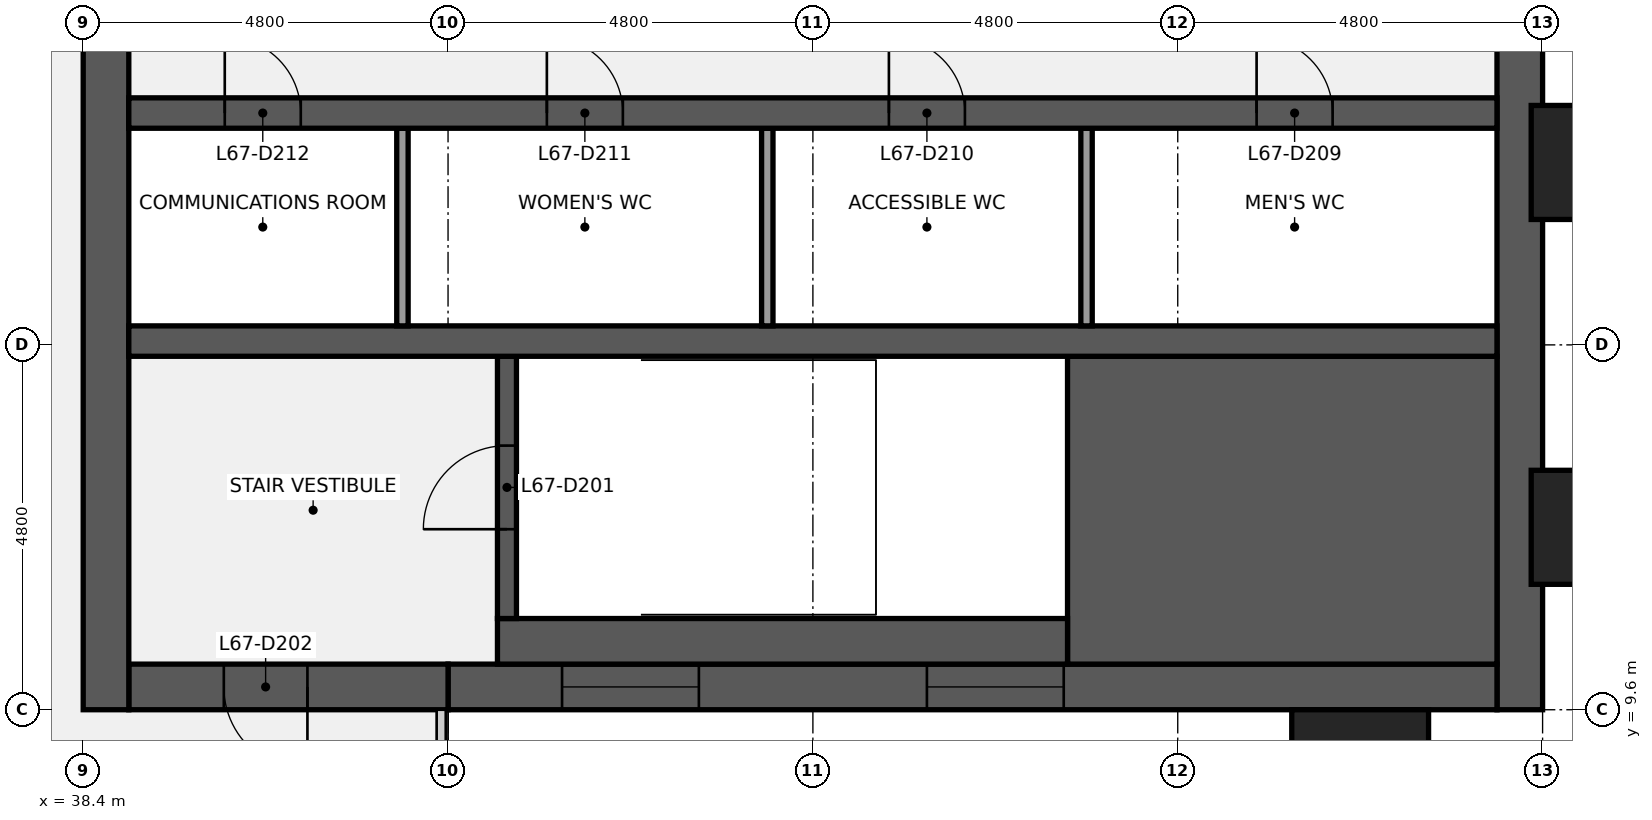
"""IFC4 building model, lengths in metres.
Left out: names, types, materials, properties, quantities, classifications, styles, units other than length and angle.
Written with IfcOpenShell. Run it as: python <this file> out.ifc"""

import sys

from ifc_helpers import new_model, si_unit, direction, frame, frame_2d, origin, origin_2d, place, context, subcontext, project, spatial, rectangle, extrude, element, fill, save


model = new_model("IFC4")
c1 = context("Model", 3, precision=1e-05, world=origin(), true_north=direction((0.0, 1.0)))
c2 = subcontext(c1, "Body", "Model", "MODEL_VIEW")
j1 = project(units=[si_unit("LENGTHUNIT", "METRE"), si_unit("PLANEANGLEUNIT", "RADIAN")], contexts=[c1])
p1 = place(None, origin())
s1 = spatial("IfcSite", under=j1, at=p1, CompositionType="ELEMENT")
p2 = place(p1, origin())
s2 = spatial("IfcBuilding", under=s1, at=p2, CompositionType="ELEMENT")
p3 = place(p2, frame((0.0, 0.0, 306.3)))
s3 = spatial("IfcBuildingStorey", under=s2, at=p3, CompositionType="ELEMENT", Elevation=306.3)
p4 = place(p3, frame((57.3, 38.4, 0.0), z_axis=(0.0, 0.0, 1.0), x_axis=(0.0, -1.0, 0.0)))
e1 = element("IfcWall", 1, at=p4, inside=s3, PredefinedType="SHEAR", context=c2, shape_type="SweptSolid", body=[
    extrude(rectangle(XDim=28.8, YDim=0.6, at=frame_2d((14.4, 0.0))), origin(), (0.0, 0.0, 1.0), 3.84),
])
p5 = place(p4, frame((18.45, 0.0, 0.9)))
e2 = element("IfcOpeningElement", 2, at=p5, cuts=e1, PredefinedType="OPENING", context=c2, shape_type="SweptSolid", body=[
    extrude(rectangle(XDim=1.5, YDim=1.5, at=frame_2d((0.75, 0.75))), frame((0.0, 0.31, 0.0), z_axis=(0.0, -1.0, 0.0), x_axis=(1.0, 0.0, 0.0)), (0.0, 0.0, 1.0), 0.62),
])
p6 = place(p4, frame((8.85, 0.0, 0.9)))
e3 = element("IfcOpeningElement", 3, at=p6, cuts=e1, PredefinedType="OPENING", context=c2, shape_type="SweptSolid", body=[
    extrude(rectangle(XDim=1.5, YDim=1.5, at=frame_2d((0.75, 0.75))), frame((0.0, 0.31, 0.0), z_axis=(0.0, -1.0, 0.0), x_axis=(1.0, 0.0, 0.0)), (0.0, 0.0, 1.0), 0.62),
])
p7 = place(p3, frame((57.0, 9.9, 0.0), z_axis=(0.0, 0.0, 1.0), x_axis=(-1.0, 0.0, 0.0)))
e4 = element("IfcWall", 4, at=p7, inside=s3, PredefinedType="SHEAR", context=c2, shape_type="SweptSolid", body=[
    extrude(rectangle(XDim=13.8, YDim=0.6, at=frame_2d((6.9, 0.0))), origin(), (0.0, 0.0, 1.0), 3.84),
])
p8 = place(p7, frame((5.7, 0.0, 0.9)))
e5 = element("IfcOpeningElement", 5, at=p8, cuts=e4, PredefinedType="OPENING", context=c2, shape_type="SweptSolid", body=[
    extrude(rectangle(XDim=1.8, YDim=1.5, at=frame_2d((0.9, 0.75))), frame((0.0, 0.31, 0.0), z_axis=(0.0, -1.0, 0.0), x_axis=(1.0, 0.0, 0.0)), (0.0, 0.0, 1.0), 0.62),
])
p9 = place(p7, frame((10.5, 0.0, 0.9)))
e6 = element("IfcOpeningElement", 6, at=p9, cuts=e4, PredefinedType="OPENING", context=c2, shape_type="SweptSolid", body=[
    extrude(rectangle(XDim=1.8, YDim=1.5, at=frame_2d((0.9, 0.75))), frame((0.0, 0.31, 0.0), z_axis=(0.0, -1.0, 0.0), x_axis=(1.0, 0.0, 0.0)), (0.0, 0.0, 1.0), 0.62),
])
p10 = place(p3, frame((43.2, 9.9, 0.0), z_axis=(0.0, 0.0, 1.0), x_axis=(-1.0, 0.0, 0.0)))
e7 = element("IfcWall", 7, at=p10, inside=s3, PredefinedType="SHEAR", context=c2, shape_type="SweptSolid", body=[
    extrude(rectangle(XDim=4.2, YDim=0.6, at=frame_2d((2.1, 0.0))), origin(), (0.0, 0.0, 1.0), 3.84),
])
p11 = place(p10, frame((1.85, 0.0, 0.0)))
e8 = element("IfcOpeningElement", 8, at=p11, cuts=e7, PredefinedType="OPENING", context=c2, shape_type="SweptSolid", body=[
    extrude(rectangle(XDim=1.1, YDim=2.1, at=frame_2d((0.55, 1.05))), frame((0.0, 0.31, 0.0), z_axis=(0.0, -1.0, 0.0), x_axis=(1.0, 0.0, 0.0)), (0.0, 0.0, 1.0), 0.62),
])
p12 = place(p3, frame((38.7, 9.6, 0.0), z_axis=(0.0, 0.0, 1.0), x_axis=(0.0, 1.0, 0.0)))
e9 = element("IfcWall", 9, at=p12, inside=s3, PredefinedType="SHEAR", context=c2, shape_type="SweptSolid", body=[
    extrude(rectangle(XDim=28.8, YDim=0.6, at=frame_2d((14.4, 0.0))), origin(), (0.0, 0.0, 1.0), 3.84),
])
p13 = place(p12, frame((8.7, 0.0, 0.0)))
e10 = element("IfcOpeningElement", 10, at=p13, cuts=e9, PredefinedType="OPENING", context=c2, shape_type="SweptSolid", body=[
    extrude(rectangle(XDim=1.8, YDim=2.1, at=frame_2d((0.9, 1.05))), frame((0.0, 0.31, 0.0), z_axis=(0.0, -1.0, 0.0), x_axis=(1.0, 0.0, 0.0)), (0.0, 0.0, 1.0), 0.62),
])
p14 = place(p12, frame((18.3, 0.0, 0.0)))
e11 = element("IfcOpeningElement", 11, at=p14, cuts=e9, PredefinedType="OPENING", context=c2, shape_type="SweptSolid", body=[
    extrude(rectangle(XDim=1.8, YDim=2.1, at=frame_2d((0.9, 1.05))), frame((0.0, 0.31, 0.0), z_axis=(0.0, -1.0, 0.0), x_axis=(1.0, 0.0, 0.0)), (0.0, 0.0, 1.0), 0.62),
])
p15 = place(p3, frame((51.35, 12.225, 0.0), z_axis=(0.0, 0.0, 1.0), x_axis=(1.0, 0.0, 0.0)))
e12 = element("IfcWall", 12, at=p15, inside=s3, PredefinedType="SHEAR", context=c2, shape_type="SweptSolid", body=[
    extrude(rectangle(XDim=5.65, YDim=4.05, at=frame_2d((2.825, 0.0))), origin(), (0.0, 0.0, 1.0), 3.84),
])
p16 = place(p3, frame((43.85, 10.5, 0.0), z_axis=(0.0, 0.0, 1.0), x_axis=(1.0, 0.0, 0.0)))
e13 = element("IfcWall", 13, at=p16, inside=s3, PredefinedType="SHEAR", context=c2, shape_type="SweptSolid", body=[
    extrude(rectangle(XDim=7.5, YDim=0.6, at=frame_2d((3.75, 0.0))), origin(), (0.0, 0.0, 1.0), 3.84),
])
p17 = place(p3, frame((43.975, 10.8, 0.0), z_axis=(0.0, 0.0, 1.0), x_axis=(0.0, 1.0, 0.0)))
e14 = element("IfcWall", 14, at=p17, inside=s3, PredefinedType="SHEAR", context=c2, shape_type="SweptSolid", body=[
    extrude(rectangle(XDim=3.45, YDim=0.25, at=frame_2d((1.725, 0.0))), origin(), (0.0, 0.0, 1.0), 3.84),
])
p18 = place(p17, frame((1.175, 0.0, 0.0)))
e15 = element("IfcOpeningElement", 15, at=p18, cuts=e14, PredefinedType="OPENING", context=c2, shape_type="SweptSolid", body=[
    extrude(rectangle(XDim=1.1, YDim=2.1, at=frame_2d((0.55, 1.05))), frame((0.0, 0.135, 0.0), z_axis=(0.0, -1.0, 0.0), x_axis=(1.0, 0.0, 0.0)), (0.0, 0.0, 1.0), 0.27),
])
p19 = place(p3, frame((39.0, 14.45, 0.0), z_axis=(0.0, 0.0, 1.0), x_axis=(1.0, 0.0, 0.0)))
e16 = element("IfcWall", 16, at=p19, inside=s3, PredefinedType="SHEAR", context=c2, shape_type="SweptSolid", body=[
    extrude(rectangle(XDim=18.0, YDim=0.4, at=frame_2d((9.0, 0.0))), origin(), (0.0, 0.0, 1.0), 3.84),
])
for number, where, z_axis, x_axis in (
    (17, (51.6, 14.65, 0.0), (0.0, 0.0, 1.0), (0.0, 1.0, 0.0)),
    (18, (47.4, 14.65, 0.0), (0.0, 0.0, 1.0), (0.0, 1.0, 0.0)),
    (19, (42.6, 14.65, 0.0), (0.0, 0.0, 1.0), (0.0, 1.0, 0.0)),
):
    element("IfcWall", number, at=place(p3, frame(where, z_axis=z_axis, x_axis=x_axis)), inside=s3, PredefinedType="PARTITIONING", context=c2, shape_type="SweptSolid", body=[
        extrude(rectangle(XDim=2.6, YDim=0.15, at=frame_2d((1.3, 0.0))), origin(), (0.0, 0.0, 1.0), 3.84),
    ])
p20 = place(p3, frame((39.0, 17.45, 0.0), z_axis=(0.0, 0.0, 1.0), x_axis=(1.0, 0.0, 0.0)))
e20 = element("IfcWall", 20, at=p20, inside=s3, PredefinedType="SHEAR", context=c2, shape_type="SweptSolid", body=[
    extrude(rectangle(XDim=18.0, YDim=0.4, at=frame_2d((9.0, 0.0))), origin(), (0.0, 0.0, 1.0), 3.84),
])
p21 = place(p20, frame((14.837, 0.0, 0.0)))
e21 = element("IfcOpeningElement", 21, at=p21, cuts=e20, PredefinedType="OPENING", context=c2, shape_type="SweptSolid", body=[
    extrude(rectangle(XDim=1.0, YDim=2.1, at=frame_2d((0.5, 1.05))), frame((0.0, 0.21, 0.0), z_axis=(0.0, -1.0, 0.0), x_axis=(1.0, 0.0, 0.0)), (0.0, 0.0, 1.0), 0.42),
])
p22 = place(p20, frame((10.0, 0.0, 0.0)))
e22 = element("IfcOpeningElement", 22, at=p22, cuts=e20, PredefinedType="OPENING", context=c2, shape_type="SweptSolid", body=[
    extrude(rectangle(XDim=1.0, YDim=2.1, at=frame_2d((0.5, 1.05))), frame((0.0, 0.21, 0.0), z_axis=(0.0, -1.0, 0.0), x_axis=(1.0, 0.0, 0.0)), (0.0, 0.0, 1.0), 0.42),
])
p23 = place(p20, frame((5.5, 0.0, 0.0)))
e23 = element("IfcOpeningElement", 23, at=p23, cuts=e20, PredefinedType="OPENING", context=c2, shape_type="SweptSolid", body=[
    extrude(rectangle(XDim=1.0, YDim=2.1, at=frame_2d((0.5, 1.05))), frame((0.0, 0.21, 0.0), z_axis=(0.0, -1.0, 0.0), x_axis=(1.0, 0.0, 0.0)), (0.0, 0.0, 1.0), 0.42),
])
p24 = place(p20, frame((1.262, 0.0, 0.0)))
e24 = element("IfcOpeningElement", 24, at=p24, cuts=e20, PredefinedType="OPENING", context=c2, shape_type="SweptSolid", body=[
    extrude(rectangle(XDim=1.0, YDim=2.1, at=frame_2d((0.5, 1.05))), frame((0.0, 0.21, 0.0), z_axis=(0.0, -1.0, 0.0), x_axis=(1.0, 0.0, 0.0)), (0.0, 0.0, 1.0), 0.42),
])
for number, where, z_axis, x_axis in (
    (25, (55.2, 8.85, 0.0), (0.0, 0.0, 1.0), (1.0, 0.0, 0.0)),
    (26, (58.35, 12.0, 0.0), (0.0, 0.0, 1.0), (0.0, 1.0, 0.0)),
    (27, (58.35, 16.8, 0.0), (0.0, 0.0, 1.0), (0.0, 1.0, 0.0)),
):
    element("IfcColumn", number, at=place(p3, frame(where, z_axis=z_axis, x_axis=x_axis)), inside=s3, PredefinedType="PILASTER", context=c2, shape_type="SweptSolid", body=[
        extrude(rectangle(XDim=1.8, YDim=1.5, at=origin_2d()), origin(), (0.0, 0.0, 1.0), 4.0),
    ])
p25 = place(p18, origin())
e28 = element("IfcDoor", 28, at=p25, inside=s3, OperationType="SINGLE_SWING_LEFT", PredefinedType="DOOR", context=c2, shape_type="SweptSolid", body=[
    extrude(rectangle(XDim=1.1, YDim=2.1, at=frame_2d((0.55, 1.05))), frame((0.0, 0.025, 0.0), z_axis=(0.0, -1.0, 0.0), x_axis=(1.0, 0.0, 0.0)), (0.0, 0.0, 1.0), 0.05),
])
fill(e15, e28)
p26 = place(p11, origin())
e29 = element("IfcDoor", 29, at=p26, inside=s3, OperationType="SINGLE_SWING_LEFT", PredefinedType="DOOR", context=c2, shape_type="SweptSolid", body=[
    extrude(rectangle(XDim=1.1, YDim=2.1, at=frame_2d((0.55, 1.05))), frame((0.0, 0.025, 0.0), z_axis=(0.0, -1.0, 0.0), x_axis=(1.0, 0.0, 0.0)), (0.0, 0.0, 1.0), 0.05),
])
fill(e8, e29)
p27 = place(p21, origin())
e30 = element("IfcDoor", 30, at=p27, inside=s3, OperationType="SINGLE_SWING_LEFT", PredefinedType="DOOR", context=c2, shape_type="SweptSolid", body=[
    extrude(rectangle(XDim=1.0, YDim=2.1, at=frame_2d((0.5, 1.05))), frame((0.0, 0.025, 0.0), z_axis=(0.0, -1.0, 0.0), x_axis=(1.0, 0.0, 0.0)), (0.0, 0.0, 1.0), 0.05),
])
fill(e21, e30)
p28 = place(p22, origin())
e31 = element("IfcDoor", 31, at=p28, inside=s3, OperationType="SINGLE_SWING_LEFT", PredefinedType="DOOR", context=c2, shape_type="SweptSolid", body=[
    extrude(rectangle(XDim=1.0, YDim=2.1, at=frame_2d((0.5, 1.05))), frame((0.0, 0.025, 0.0), z_axis=(0.0, -1.0, 0.0), x_axis=(1.0, 0.0, 0.0)), (0.0, 0.0, 1.0), 0.05),
])
fill(e22, e31)
p29 = place(p23, origin())
e32 = element("IfcDoor", 32, at=p29, inside=s3, OperationType="SINGLE_SWING_LEFT", PredefinedType="DOOR", context=c2, shape_type="SweptSolid", body=[
    extrude(rectangle(XDim=1.0, YDim=2.1, at=frame_2d((0.5, 1.05))), frame((0.0, 0.025, 0.0), z_axis=(0.0, -1.0, 0.0), x_axis=(1.0, 0.0, 0.0)), (0.0, 0.0, 1.0), 0.05),
])
fill(e23, e32)
p30 = place(p24, origin())
e33 = element("IfcDoor", 33, at=p30, inside=s3, OperationType="SINGLE_SWING_LEFT", PredefinedType="DOOR", context=c2, shape_type="SweptSolid", body=[
    extrude(rectangle(XDim=1.0, YDim=2.1, at=frame_2d((0.5, 1.05))), frame((0.0, 0.025, 0.0), z_axis=(0.0, -1.0, 0.0), x_axis=(1.0, 0.0, 0.0)), (0.0, 0.0, 1.0), 0.05),
])
fill(e24, e33)
p31 = place(p8, origin())
e34 = element("IfcWindow", 34, at=p31, inside=s3, PartitioningType="SINGLE_PANEL", PredefinedType="WINDOW", context=c2, shape_type="SweptSolid", body=[
    extrude(rectangle(XDim=1.8, YDim=1.5, at=frame_2d((0.9, 0.75))), frame((0.0, 0.03, 0.0), z_axis=(0.0, -1.0, 0.0), x_axis=(1.0, 0.0, 0.0)), (0.0, 0.0, 1.0), 0.06),
])
fill(e5, e34)
p32 = place(p9, origin())
e35 = element("IfcWindow", 35, at=p32, inside=s3, PartitioningType="SINGLE_PANEL", PredefinedType="WINDOW", context=c2, shape_type="SweptSolid", body=[
    extrude(rectangle(XDim=1.8, YDim=1.5, at=frame_2d((0.9, 0.75))), frame((0.0, 0.03, 0.0), z_axis=(0.0, -1.0, 0.0), x_axis=(1.0, 0.0, 0.0)), (0.0, 0.0, 1.0), 0.06),
])
fill(e6, e35)
save(model, sys.argv[1])
